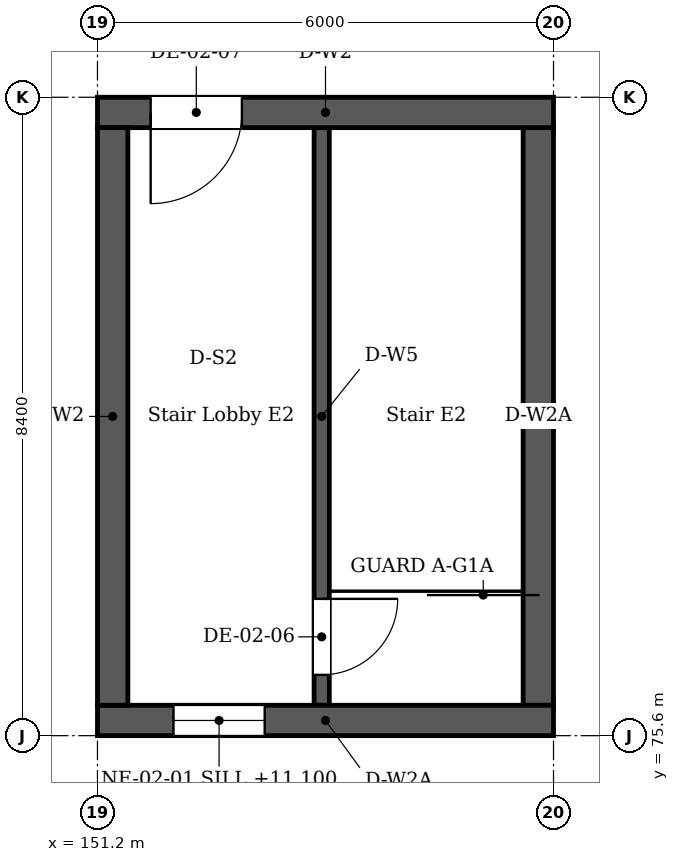
"""IFC4 building model, lengths in metres.
Left out: names, types, materials, properties, quantities, classifications, styles, units other than length and angle.
Written with IfcOpenShell. Run it as: python <this file> out.ifc"""

import sys

from ifc_helpers import new_model, si_unit, direction, frame, frame_2d, origin, place, context, subcontext, project, spatial, rectangle, extrude, element, fill, save


model = new_model("IFC4")
c1 = context("Model", 3, precision=1e-05, world=origin(), true_north=direction((0.0, 1.0)))
c2 = subcontext(c1, "Body", "Model", "MODEL_VIEW")
j1 = project(units=[si_unit("LENGTHUNIT", "METRE"), si_unit("PLANEANGLEUNIT", "RADIAN")], contexts=[c1])
p1 = place(None, origin())
s1 = spatial("IfcSite", under=j1, at=p1, CompositionType="ELEMENT")
p2 = place(p1, origin())
s2 = spatial("IfcBuilding", under=s1, at=p2, CompositionType="ELEMENT")
p3 = place(p2, frame((0.0, 0.0, 10.2)))
s3 = spatial("IfcBuildingStorey", under=s2, at=p3, CompositionType="ELEMENT", Elevation=10.2)
p4 = place(p3, frame((151.2, 75.8, 0.0), z_axis=(0.0, 0.0, 1.0), x_axis=(1.0, 0.0, 0.0)))
e1 = element("IfcWall", 1, at=p4, inside=s3, PredefinedType="SOLIDWALL", context=c2, shape_type="SweptSolid", body=[
    extrude(rectangle(XDim=6.0, YDim=0.4, at=frame_2d((3.0, 0.0))), origin(), (0.0, 0.0, 1.0), 3.92),
])
p5 = place(p4, frame((1.0, 0.0, 0.9)))
e2 = element("IfcOpeningElement", 2, at=p5, cuts=e1, PredefinedType="OPENING", context=c2, shape_type="SweptSolid", body=[
    extrude(rectangle(XDim=1.2, YDim=1.5, at=frame_2d((0.6, 0.75))), frame((0.0, 0.21, 0.0), z_axis=(0.0, -1.0, 0.0), x_axis=(1.0, 0.0, 0.0)), (0.0, 0.0, 1.0), 0.42),
])
p6 = place(p3, frame((151.2, 83.8, 0.0), z_axis=(0.0, 0.0, 1.0), x_axis=(1.0, 0.0, 0.0)))
e3 = element("IfcWall", 3, at=p6, inside=s3, PredefinedType="SOLIDWALL", context=c2, shape_type="SweptSolid", body=[
    extrude(rectangle(XDim=6.0, YDim=0.4, at=frame_2d((3.0, 0.0))), origin(), (0.0, 0.0, 1.0), 3.92),
])
p7 = place(p6, frame((0.7, 0.0, 0.0)))
e4 = element("IfcOpeningElement", 4, at=p7, cuts=e3, PredefinedType="OPENING", context=c2, shape_type="SweptSolid", body=[
    extrude(rectangle(XDim=1.2, YDim=2.1, at=frame_2d((0.6, 1.05))), frame((0.0, 0.21, 0.0), z_axis=(0.0, -1.0, 0.0), x_axis=(1.0, 0.0, 0.0)), (0.0, 0.0, 1.0), 0.42),
])
for number, where, z_axis, x_axis in (
    (5, (151.4, 76.0, 0.0), (0.0, 0.0, 1.0), (0.0, 1.0, 0.0)),
    (6, (157.0, 76.0, 0.0), (0.0, 0.0, 1.0), (0.0, 1.0, 0.0)),
):
    element("IfcWall", number, at=place(p3, frame(where, z_axis=z_axis, x_axis=x_axis)), inside=s3, PredefinedType="SOLIDWALL", context=c2, shape_type="SweptSolid", body=[
        extrude(rectangle(XDim=7.6, YDim=0.4, at=frame_2d((3.8, 0.0))), origin(), (0.0, 0.0, 1.0), 3.92),
    ])
p8 = place(p3, frame((154.15, 76.0, 0.0), z_axis=(0.0, 0.0, 1.0), x_axis=(0.0, 1.0, 0.0)))
e7 = element("IfcWall", 7, at=p8, inside=s3, PredefinedType="SOLIDWALL", context=c2, shape_type="SweptSolid", body=[
    extrude(rectangle(XDim=7.6, YDim=0.2, at=frame_2d((3.8, 0.0))), origin(), (0.0, 0.0, 1.0), 3.92),
])
p9 = place(p8, frame((0.4, 0.0, 0.0)))
e8 = element("IfcOpeningElement", 8, at=p9, cuts=e7, PredefinedType="OPENING", context=c2, shape_type="SweptSolid", body=[
    extrude(rectangle(XDim=1.0, YDim=2.1, at=frame_2d((0.5, 1.05))), frame((0.0, 0.11, 0.0), z_axis=(0.0, -1.0, 0.0), x_axis=(1.0, 0.0, 0.0)), (0.0, 0.0, 1.0), 0.22),
])
p10 = place(p5, origin())
e9 = element("IfcWindow", 9, at=p10, inside=s3, PartitioningType="SINGLE_PANEL", PredefinedType="WINDOW", context=c2, shape_type="SweptSolid", body=[
    extrude(rectangle(XDim=1.2, YDim=1.5, at=frame_2d((0.6, 0.75))), frame((0.0, 0.03, 0.0), z_axis=(0.0, -1.0, 0.0), x_axis=(1.0, 0.0, 0.0)), (0.0, 0.0, 1.0), 0.06),
])
fill(e2, e9)
p11 = place(p9, origin())
e10 = element("IfcDoor", 10, at=p11, inside=s3, OperationType="SINGLE_SWING_LEFT", PredefinedType="DOOR", context=c2, shape_type="SweptSolid", body=[
    extrude(rectangle(XDim=1.0, YDim=2.1, at=frame_2d((0.5, 1.05))), frame((0.0, 0.025, 0.0), z_axis=(0.0, -1.0, 0.0), x_axis=(1.0, 0.0, 0.0)), (0.0, 0.0, 1.0), 0.05),
])
fill(e8, e10)
p12 = place(p7, origin())
e11 = element("IfcDoor", 11, at=p12, inside=s3, OperationType="SINGLE_SWING_LEFT", PredefinedType="DOOR", context=c2, shape_type="SweptSolid", body=[
    extrude(rectangle(XDim=1.2, YDim=2.1, at=frame_2d((0.6, 1.05))), frame((0.0, 0.025, 0.0), z_axis=(0.0, -1.0, 0.0), x_axis=(1.0, 0.0, 0.0)), (0.0, 0.0, 1.0), 0.05),
])
fill(e4, e11)
save(model, sys.argv[1])
